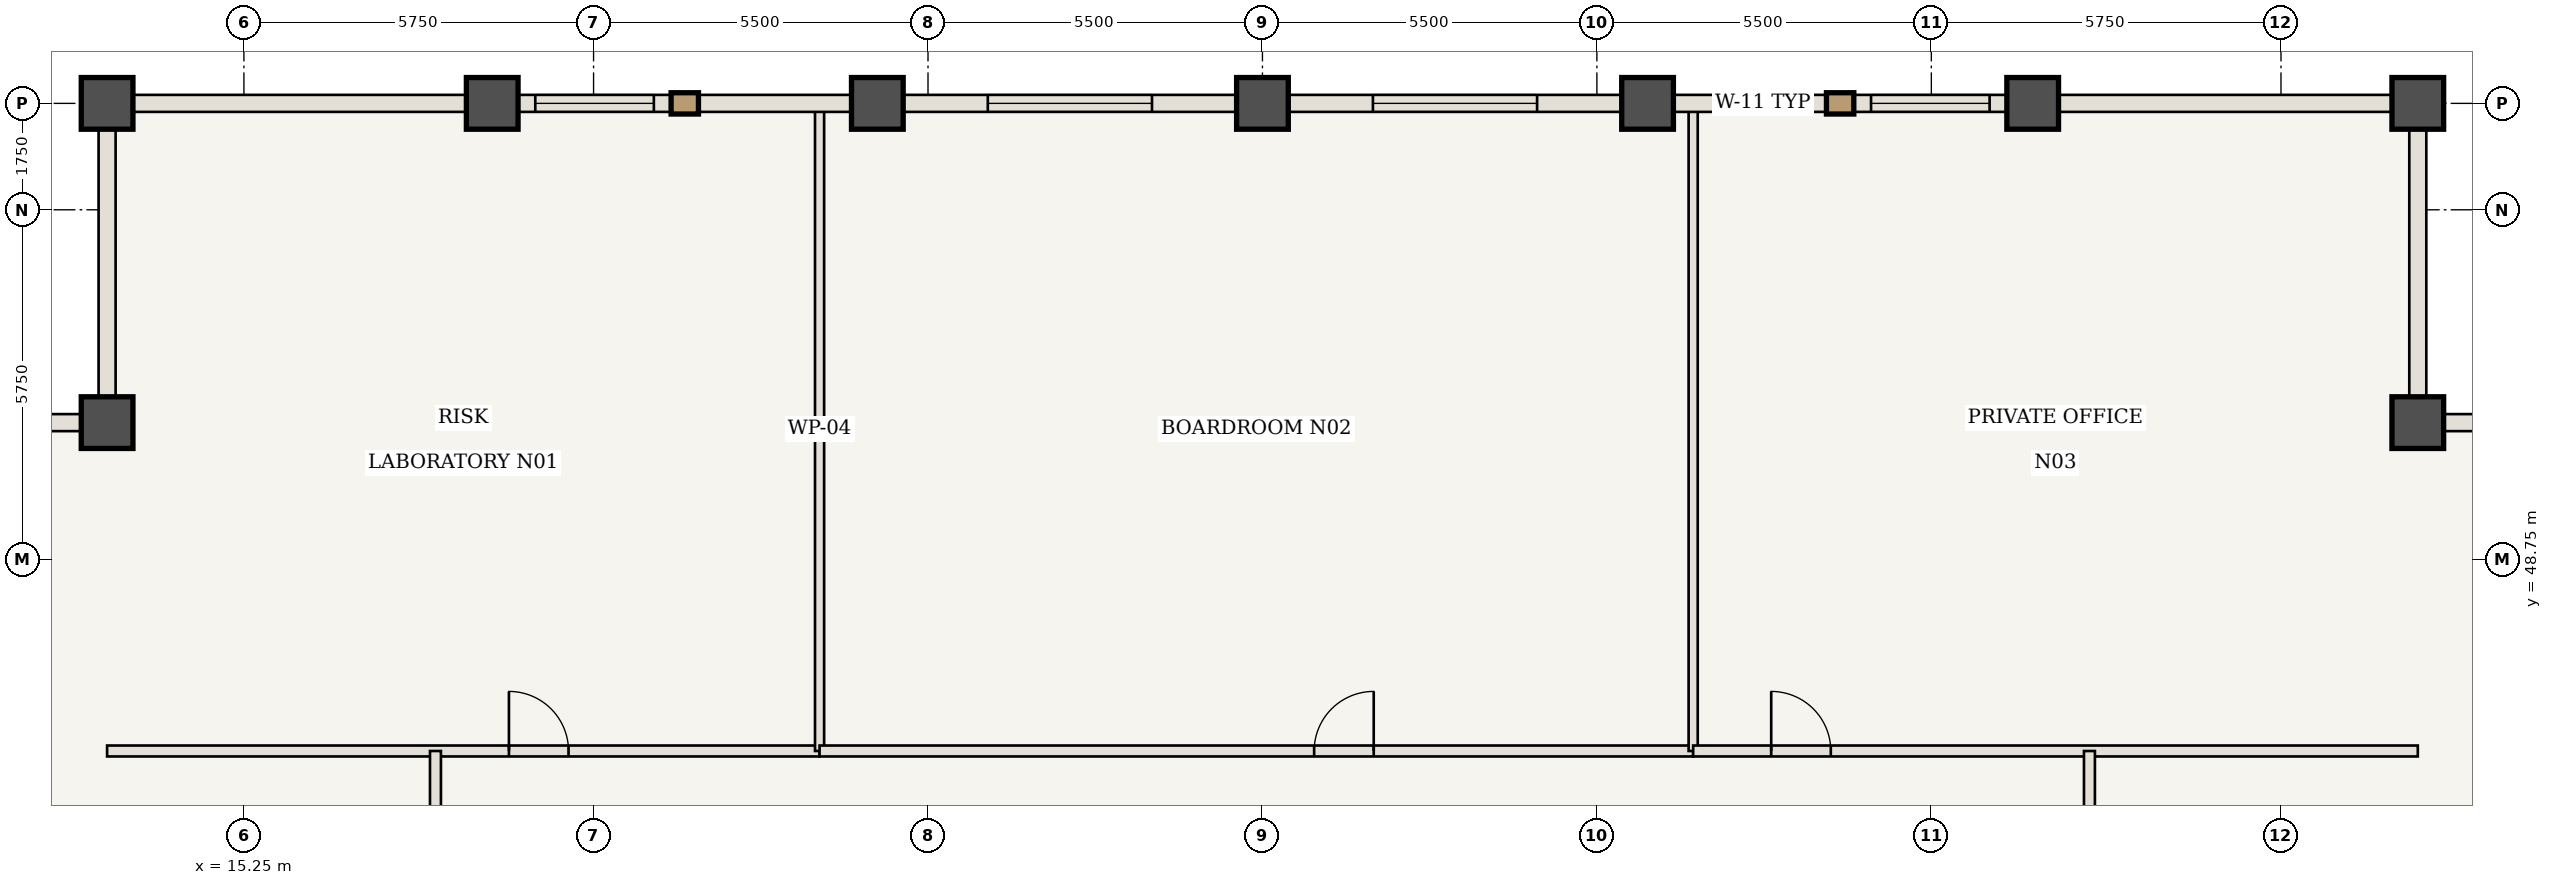
"""IFC4 building model, lengths in metres.
Left out: names, types, materials, properties, quantities, classifications, styles, units other than length and angle.
Written with IfcOpenShell. Run it as: python <this file> out.ifc"""

import sys

from ifc_helpers import new_model, si_unit, direction, frame, frame_2d, origin, origin_2d, place, context, subcontext, project, spatial, rectangle, extrude, element, fill, save


model = new_model("IFC4")
c1 = context("Model", 3, precision=1e-05, world=origin(), true_north=direction((0.0, 1.0)))
c2 = subcontext(c1, "Body", "Model", "MODEL_VIEW")
j1 = project(units=[si_unit("LENGTHUNIT", "METRE"), si_unit("PLANEANGLEUNIT", "RADIAN")], contexts=[c1])
p1 = place(None, origin())
s1 = spatial("IfcSite", under=j1, at=p1, CompositionType="ELEMENT")
p2 = place(p1, origin())
s2 = spatial("IfcBuilding", under=s1, at=p2, CompositionType="ELEMENT")
p3 = place(p2, frame((0.0, 0.0, 186.9)))
s3 = spatial("IfcBuildingStorey", under=s2, at=p3, CompositionType="ELEMENT", Elevation=186.9)
for number, where, z_axis, x_axis in (
    (1, (51.0, 51.0, 0.0), (0.0, 0.0, 1.0), (1.0, 0.0, 0.0)),
    (2, (51.0, 56.25, 0.0), (0.0, 0.0, 1.0), (1.0, 0.0, 0.0)),
    (3, (13.0, 56.25, 0.0), (0.0, 0.0, 1.0), (1.0, 0.0, 0.0)),
    (4, (13.0, 51.0, 0.0), (0.0, 0.0, 1.0), (1.0, 0.0, 0.0)),
    (5, (19.333, 56.25, 0.0), (0.0, 0.0, 1.0), (1.0, 0.0, 0.0)),
    (6, (25.667, 56.25, 0.0), (0.0, 0.0, 1.0), (1.0, 0.0, 0.0)),
    (7, (32.0, 56.25, 0.0), (0.0, 0.0, 1.0), (1.0, 0.0, 0.0)),
    (8, (38.333, 56.25, 0.0), (0.0, 0.0, 1.0), (1.0, 0.0, 0.0)),
    (9, (44.667, 56.25, 0.0), (0.0, 0.0, 1.0), (1.0, 0.0, 0.0)),
):
    element("IfcColumn", number, at=place(p3, frame(where, z_axis=z_axis, x_axis=x_axis)), inside=s3, PredefinedType="COLUMN", context=c2, shape_type="SweptSolid", body=[
        extrude(rectangle(XDim=0.85, YDim=0.85, at=origin_2d()), origin(), (0.0, 0.0, 1.0), 3.85),
    ])
p4 = place(p3, frame((13.0, 45.6, 0.0), z_axis=(0.0, 0.0, 1.0), x_axis=(1.0, 0.0, 0.0)))
e10 = element("IfcWall", 10, at=p4, inside=s3, PredefinedType="STANDARD", context=c2, shape_type="SweptSolid", body=[
    extrude(rectangle(XDim=11.717, YDim=0.18, at=frame_2d((5.858, 0.0))), origin(), (0.0, 0.0, 1.0), 3.43),
])
p5 = place(p4, frame((6.608, 0.0, 0.0)))
e11 = element("IfcOpeningElement", 11, at=p5, cuts=e10, PredefinedType="OPENING", context=c2, shape_type="SweptSolid", body=[
    extrude(rectangle(XDim=0.98, YDim=2.2, at=frame_2d((0.49, 1.1))), frame((0.0, 0.1, 0.0), z_axis=(0.0, -1.0, 0.0), x_axis=(1.0, 0.0, 0.0)), (0.0, 0.0, 1.0), 0.2),
])
p6 = place(p3, frame((24.717, 45.6, 0.0), z_axis=(0.0, 0.0, 1.0), x_axis=(0.0, 1.0, 0.0)))
e12 = element("IfcWall", 12, at=p6, inside=s3, PredefinedType="STANDARD", context=c2, shape_type="SweptSolid", body=[
    extrude(rectangle(XDim=10.59, YDim=0.15, at=frame_2d((5.295, 0.0))), origin(), (0.0, 0.0, 1.0), 3.43),
])
p7 = place(p3, frame((24.717, 45.6, 0.0), z_axis=(0.0, 0.0, 1.0), x_axis=(1.0, 0.0, 0.0)))
e13 = element("IfcWall", 13, at=p7, inside=s3, PredefinedType="STANDARD", context=c2, shape_type="SweptSolid", body=[
    extrude(rectangle(XDim=14.366, YDim=0.18, at=frame_2d((7.183, 0.0))), origin(), (0.0, 0.0, 1.0), 3.43),
])
p8 = place(p7, frame((8.133, 0.0, 0.0)))
e14 = element("IfcOpeningElement", 14, at=p8, cuts=e13, PredefinedType="OPENING", context=c2, shape_type="SweptSolid", body=[
    extrude(rectangle(XDim=0.98, YDim=2.2, at=frame_2d((0.49, 1.1))), frame((0.0, 0.1, 0.0), z_axis=(0.0, -1.0, 0.0), x_axis=(1.0, 0.0, 0.0)), (0.0, 0.0, 1.0), 0.2),
])
p9 = place(p3, frame((39.083, 45.6, 0.0), z_axis=(0.0, 0.0, 1.0), x_axis=(0.0, 1.0, 0.0)))
e15 = element("IfcWall", 15, at=p9, inside=s3, PredefinedType="STANDARD", context=c2, shape_type="SweptSolid", body=[
    extrude(rectangle(XDim=10.59, YDim=0.15, at=frame_2d((5.295, 0.0))), origin(), (0.0, 0.0, 1.0), 3.43),
])
p10 = place(p3, frame((39.083, 45.6, 0.0), z_axis=(0.0, 0.0, 1.0), x_axis=(1.0, 0.0, 0.0)))
e16 = element("IfcWall", 16, at=p10, inside=s3, PredefinedType="STANDARD", context=c2, shape_type="SweptSolid", body=[
    extrude(rectangle(XDim=11.917, YDim=0.18, at=frame_2d((5.958, 0.0))), origin(), (0.0, 0.0, 1.0), 3.43),
])
p11 = place(p10, frame((1.283, 0.0, 0.0)))
e17 = element("IfcOpeningElement", 17, at=p11, cuts=e16, PredefinedType="OPENING", context=c2, shape_type="SweptSolid", body=[
    extrude(rectangle(XDim=0.98, YDim=2.2, at=frame_2d((0.49, 1.1))), frame((0.0, 0.1, 0.0), z_axis=(0.0, -1.0, 0.0), x_axis=(1.0, 0.0, 0.0)), (0.0, 0.0, 1.0), 0.2),
])
p12 = place(p3, frame((18.4, 37.833, 0.0), z_axis=(0.0, 0.0, 1.0), x_axis=(0.0, 1.0, 0.0)))
e18 = element("IfcWall", 18, at=p12, inside=s3, PredefinedType="STANDARD", context=c2, shape_type="SweptSolid", body=[
    extrude(rectangle(XDim=7.767, YDim=0.18, at=frame_2d((3.883, 0.0))), origin(), (0.0, 0.0, 1.0), 3.43),
])
p13 = place(p12, frame((3.383, 0.0, 0.0)))
e19 = element("IfcOpeningElement", 19, at=p13, cuts=e18, PredefinedType="OPENING", context=c2, shape_type="SweptSolid", body=[
    extrude(rectangle(XDim=0.98, YDim=2.2, at=frame_2d((0.49, 1.1))), frame((0.0, 0.1, 0.0), z_axis=(0.0, -1.0, 0.0), x_axis=(1.0, 0.0, 0.0)), (0.0, 0.0, 1.0), 0.2),
])
p14 = place(p3, frame((45.6, 31.8, 0.0), z_axis=(0.0, 0.0, 1.0), x_axis=(0.0, 1.0, 0.0)))
e20 = element("IfcWall", 20, at=p14, inside=s3, PredefinedType="STANDARD", context=c2, shape_type="SweptSolid", body=[
    extrude(rectangle(XDim=13.8, YDim=0.18, at=frame_2d((6.9, 0.0))), origin(), (0.0, 0.0, 1.0), 3.43),
])
p15 = place(p14, frame((6.4, 0.0, 0.0)))
e21 = element("IfcOpeningElement", 21, at=p15, cuts=e20, PredefinedType="OPENING", context=c2, shape_type="SweptSolid", body=[
    extrude(rectangle(XDim=0.98, YDim=2.2, at=frame_2d((0.49, 1.1))), frame((0.0, 0.1, 0.0), z_axis=(0.0, -1.0, 0.0), x_axis=(1.0, 0.0, 0.0)), (0.0, 0.0, 1.0), 0.2),
])
p16 = place(p3, frame((13.0, 56.25, 0.0), z_axis=(0.0, 0.0, 1.0), x_axis=(1.0, 0.0, 0.0)))
e22 = element("IfcWall", 22, at=p16, inside=s3, PredefinedType="USERDEFINED", context=c2, shape_type="SweptSolid", body=[
    extrude(rectangle(XDim=6.333, YDim=0.28, at=frame_2d((3.167, 0.0))), origin(), (0.0, 0.0, 1.0), 2.73),
])
p17 = place(p3, frame((19.333, 56.25, 0.0), z_axis=(0.0, 0.0, 1.0), x_axis=(1.0, 0.0, 0.0)))
e23 = element("IfcWall", 23, at=p17, inside=s3, PredefinedType="USERDEFINED", context=c2, shape_type="SweptSolid", body=[
    extrude(rectangle(XDim=6.333, YDim=0.28, at=frame_2d((3.167, 0.0))), origin(), (0.0, 0.0, 1.0), 2.73),
])
p18 = place(p17, frame((0.708, 0.0, 0.85)))
e24 = element("IfcOpeningElement", 24, at=p18, cuts=e23, PredefinedType="OPENING", context=c2, shape_type="SweptSolid", body=[
    extrude(rectangle(XDim=1.95, YDim=1.68, at=frame_2d((0.975, 0.84))), frame((0.0, 0.15, 0.0), z_axis=(0.0, -1.0, 0.0), x_axis=(1.0, 0.0, 0.0)), (0.0, 0.0, 1.0), 0.3),
])
p19 = place(p3, frame((25.667, 56.25, 0.0), z_axis=(0.0, 0.0, 1.0), x_axis=(1.0, 0.0, 0.0)))
e25 = element("IfcWall", 25, at=p19, inside=s3, PredefinedType="USERDEFINED", context=c2, shape_type="SweptSolid", body=[
    extrude(rectangle(XDim=6.333, YDim=0.28, at=frame_2d((3.167, 0.0))), origin(), (0.0, 0.0, 1.0), 2.73),
])
p20 = place(p19, frame((1.817, 0.0, 0.85)))
e26 = element("IfcOpeningElement", 26, at=p20, cuts=e25, PredefinedType="OPENING", context=c2, shape_type="SweptSolid", body=[
    extrude(rectangle(XDim=2.7, YDim=1.68, at=frame_2d((1.35, 0.84))), frame((0.0, 0.15, 0.0), z_axis=(0.0, -1.0, 0.0), x_axis=(1.0, 0.0, 0.0)), (0.0, 0.0, 1.0), 0.3),
])
p21 = place(p3, frame((32.0, 56.25, 0.0), z_axis=(0.0, 0.0, 1.0), x_axis=(1.0, 0.0, 0.0)))
e27 = element("IfcWall", 27, at=p21, inside=s3, PredefinedType="USERDEFINED", context=c2, shape_type="SweptSolid", body=[
    extrude(rectangle(XDim=6.333, YDim=0.28, at=frame_2d((3.167, 0.0))), origin(), (0.0, 0.0, 1.0), 2.73),
])
p22 = place(p21, frame((1.817, 0.0, 0.85)))
e28 = element("IfcOpeningElement", 28, at=p22, cuts=e27, PredefinedType="OPENING", context=c2, shape_type="SweptSolid", body=[
    extrude(rectangle(XDim=2.7, YDim=1.68, at=frame_2d((1.35, 0.84))), frame((0.0, 0.15, 0.0), z_axis=(0.0, -1.0, 0.0), x_axis=(1.0, 0.0, 0.0)), (0.0, 0.0, 1.0), 0.3),
])
p23 = place(p3, frame((38.333, 56.25, 0.0), z_axis=(0.0, 0.0, 1.0), x_axis=(1.0, 0.0, 0.0)))
e29 = element("IfcWall", 29, at=p23, inside=s3, PredefinedType="USERDEFINED", context=c2, shape_type="SweptSolid", body=[
    extrude(rectangle(XDim=6.333, YDim=0.28, at=frame_2d((3.167, 0.0))), origin(), (0.0, 0.0, 1.0), 2.73),
])
p24 = place(p23, frame((1.096, 0.0, 0.85)))
e30 = element("IfcOpeningElement", 30, at=p24, cuts=e29, PredefinedType="OPENING", context=c2, shape_type="SweptSolid", body=[
    extrude(rectangle(XDim=1.6, YDim=1.68, at=frame_2d((0.8, 0.84))), frame((0.0, 0.15, 0.0), z_axis=(0.0, -1.0, 0.0), x_axis=(1.0, 0.0, 0.0)), (0.0, 0.0, 1.0), 0.3),
])
p25 = place(p23, frame((3.675, 0.0, 0.85)))
e31 = element("IfcOpeningElement", 31, at=p25, cuts=e29, PredefinedType="OPENING", context=c2, shape_type="SweptSolid", body=[
    extrude(rectangle(XDim=1.95, YDim=1.68, at=frame_2d((0.975, 0.84))), frame((0.0, 0.15, 0.0), z_axis=(0.0, -1.0, 0.0), x_axis=(1.0, 0.0, 0.0)), (0.0, 0.0, 1.0), 0.3),
])
p26 = place(p3, frame((44.667, 56.25, 0.0), z_axis=(0.0, 0.0, 1.0), x_axis=(1.0, 0.0, 0.0)))
e32 = element("IfcWall", 32, at=p26, inside=s3, PredefinedType="USERDEFINED", context=c2, shape_type="SweptSolid", body=[
    extrude(rectangle(XDim=6.333, YDim=0.28, at=frame_2d((3.167, 0.0))), origin(), (0.0, 0.0, 1.0), 2.73),
])
for number, where, z_axis, x_axis in (
    (33, (51.0, 51.0, 0.0), (0.0, 0.0, 1.0), (1.0, 0.0, 0.0)),
    (34, (51.0, 56.25, 0.0), (0.0, 0.0, 1.0), (0.0, -1.0, 0.0)),
    (35, (13.0, 51.0, 0.0), (0.0, 0.0, 1.0), (0.0, 1.0, 0.0)),
    (36, (7.75, 51.0, 0.0), (0.0, 0.0, 1.0), (1.0, 0.0, 0.0)),
):
    element("IfcWall", number, at=place(p3, frame(where, z_axis=z_axis, x_axis=x_axis)), inside=s3, PredefinedType="USERDEFINED", context=c2, shape_type="SweptSolid", body=[
        extrude(rectangle(XDim=5.25, YDim=0.28, at=frame_2d((2.625, 0.0))), origin(), (0.0, 0.0, 1.0), 2.73),
    ])
p27 = place(p5, origin())
e37 = element("IfcDoor", 37, at=p27, inside=s3, OperationType="SINGLE_SWING_LEFT", PredefinedType="DOOR", context=c2, shape_type="SweptSolid", body=[
    extrude(rectangle(XDim=0.98, YDim=2.2, at=frame_2d((0.49, 1.1))), frame((0.0, 0.025, 0.0), z_axis=(0.0, -1.0, 0.0), x_axis=(1.0, 0.0, 0.0)), (0.0, 0.0, 1.0), 0.05),
])
fill(e11, e37)
p28 = place(p8, origin())
e38 = element("IfcDoor", 38, at=p28, inside=s3, OperationType="SINGLE_SWING_RIGHT", PredefinedType="DOOR", context=c2, shape_type="SweptSolid", body=[
    extrude(rectangle(XDim=0.98, YDim=2.2, at=frame_2d((0.49, 1.1))), frame((0.0, 0.025, 0.0), z_axis=(0.0, -1.0, 0.0), x_axis=(1.0, 0.0, 0.0)), (0.0, 0.0, 1.0), 0.05),
])
fill(e14, e38)
p29 = place(p11, origin())
e39 = element("IfcDoor", 39, at=p29, inside=s3, OperationType="SINGLE_SWING_LEFT", PredefinedType="DOOR", context=c2, shape_type="SweptSolid", body=[
    extrude(rectangle(XDim=0.98, YDim=2.2, at=frame_2d((0.49, 1.1))), frame((0.0, 0.025, 0.0), z_axis=(0.0, -1.0, 0.0), x_axis=(1.0, 0.0, 0.0)), (0.0, 0.0, 1.0), 0.05),
])
fill(e17, e39)
p30 = place(p18, origin())
e40 = element("IfcWindow", 40, at=p30, inside=s3, PartitioningType="SINGLE_PANEL", PredefinedType="WINDOW", context=c2, shape_type="SweptSolid", body=[
    extrude(rectangle(XDim=1.95, YDim=1.68, at=frame_2d((0.975, 0.84))), frame((0.0, 0.03, 0.0), z_axis=(0.0, -1.0, 0.0), x_axis=(1.0, 0.0, 0.0)), (0.0, 0.0, 1.0), 0.06),
])
fill(e24, e40)
p31 = place(p20, origin())
e41 = element("IfcWindow", 41, at=p31, inside=s3, PartitioningType="SINGLE_PANEL", PredefinedType="WINDOW", context=c2, shape_type="SweptSolid", body=[
    extrude(rectangle(XDim=2.7, YDim=1.68, at=frame_2d((1.35, 0.84))), frame((0.0, 0.03, 0.0), z_axis=(0.0, -1.0, 0.0), x_axis=(1.0, 0.0, 0.0)), (0.0, 0.0, 1.0), 0.06),
])
fill(e26, e41)
p32 = place(p22, origin())
e42 = element("IfcWindow", 42, at=p32, inside=s3, PartitioningType="SINGLE_PANEL", PredefinedType="WINDOW", context=c2, shape_type="SweptSolid", body=[
    extrude(rectangle(XDim=2.7, YDim=1.68, at=frame_2d((1.35, 0.84))), frame((0.0, 0.03, 0.0), z_axis=(0.0, -1.0, 0.0), x_axis=(1.0, 0.0, 0.0)), (0.0, 0.0, 1.0), 0.06),
])
fill(e28, e42)
p33 = place(p24, origin())
e43 = element("IfcWindow", 43, at=p33, inside=s3, PartitioningType="SINGLE_PANEL", PredefinedType="WINDOW", context=c2, shape_type="SweptSolid", body=[
    extrude(rectangle(XDim=1.6, YDim=1.68, at=frame_2d((0.8, 0.84))), frame((0.0, 0.03, 0.0), z_axis=(0.0, -1.0, 0.0), x_axis=(1.0, 0.0, 0.0)), (0.0, 0.0, 1.0), 0.06),
])
fill(e30, e43)
p34 = place(p25, origin())
e44 = element("IfcWindow", 44, at=p34, inside=s3, PartitioningType="SINGLE_PANEL", PredefinedType="WINDOW", context=c2, shape_type="SweptSolid", body=[
    extrude(rectangle(XDim=1.95, YDim=1.68, at=frame_2d((0.975, 0.84))), frame((0.0, 0.03, 0.0), z_axis=(0.0, -1.0, 0.0), x_axis=(1.0, 0.0, 0.0)), (0.0, 0.0, 1.0), 0.06),
])
fill(e31, e44)
save(model, sys.argv[1])
